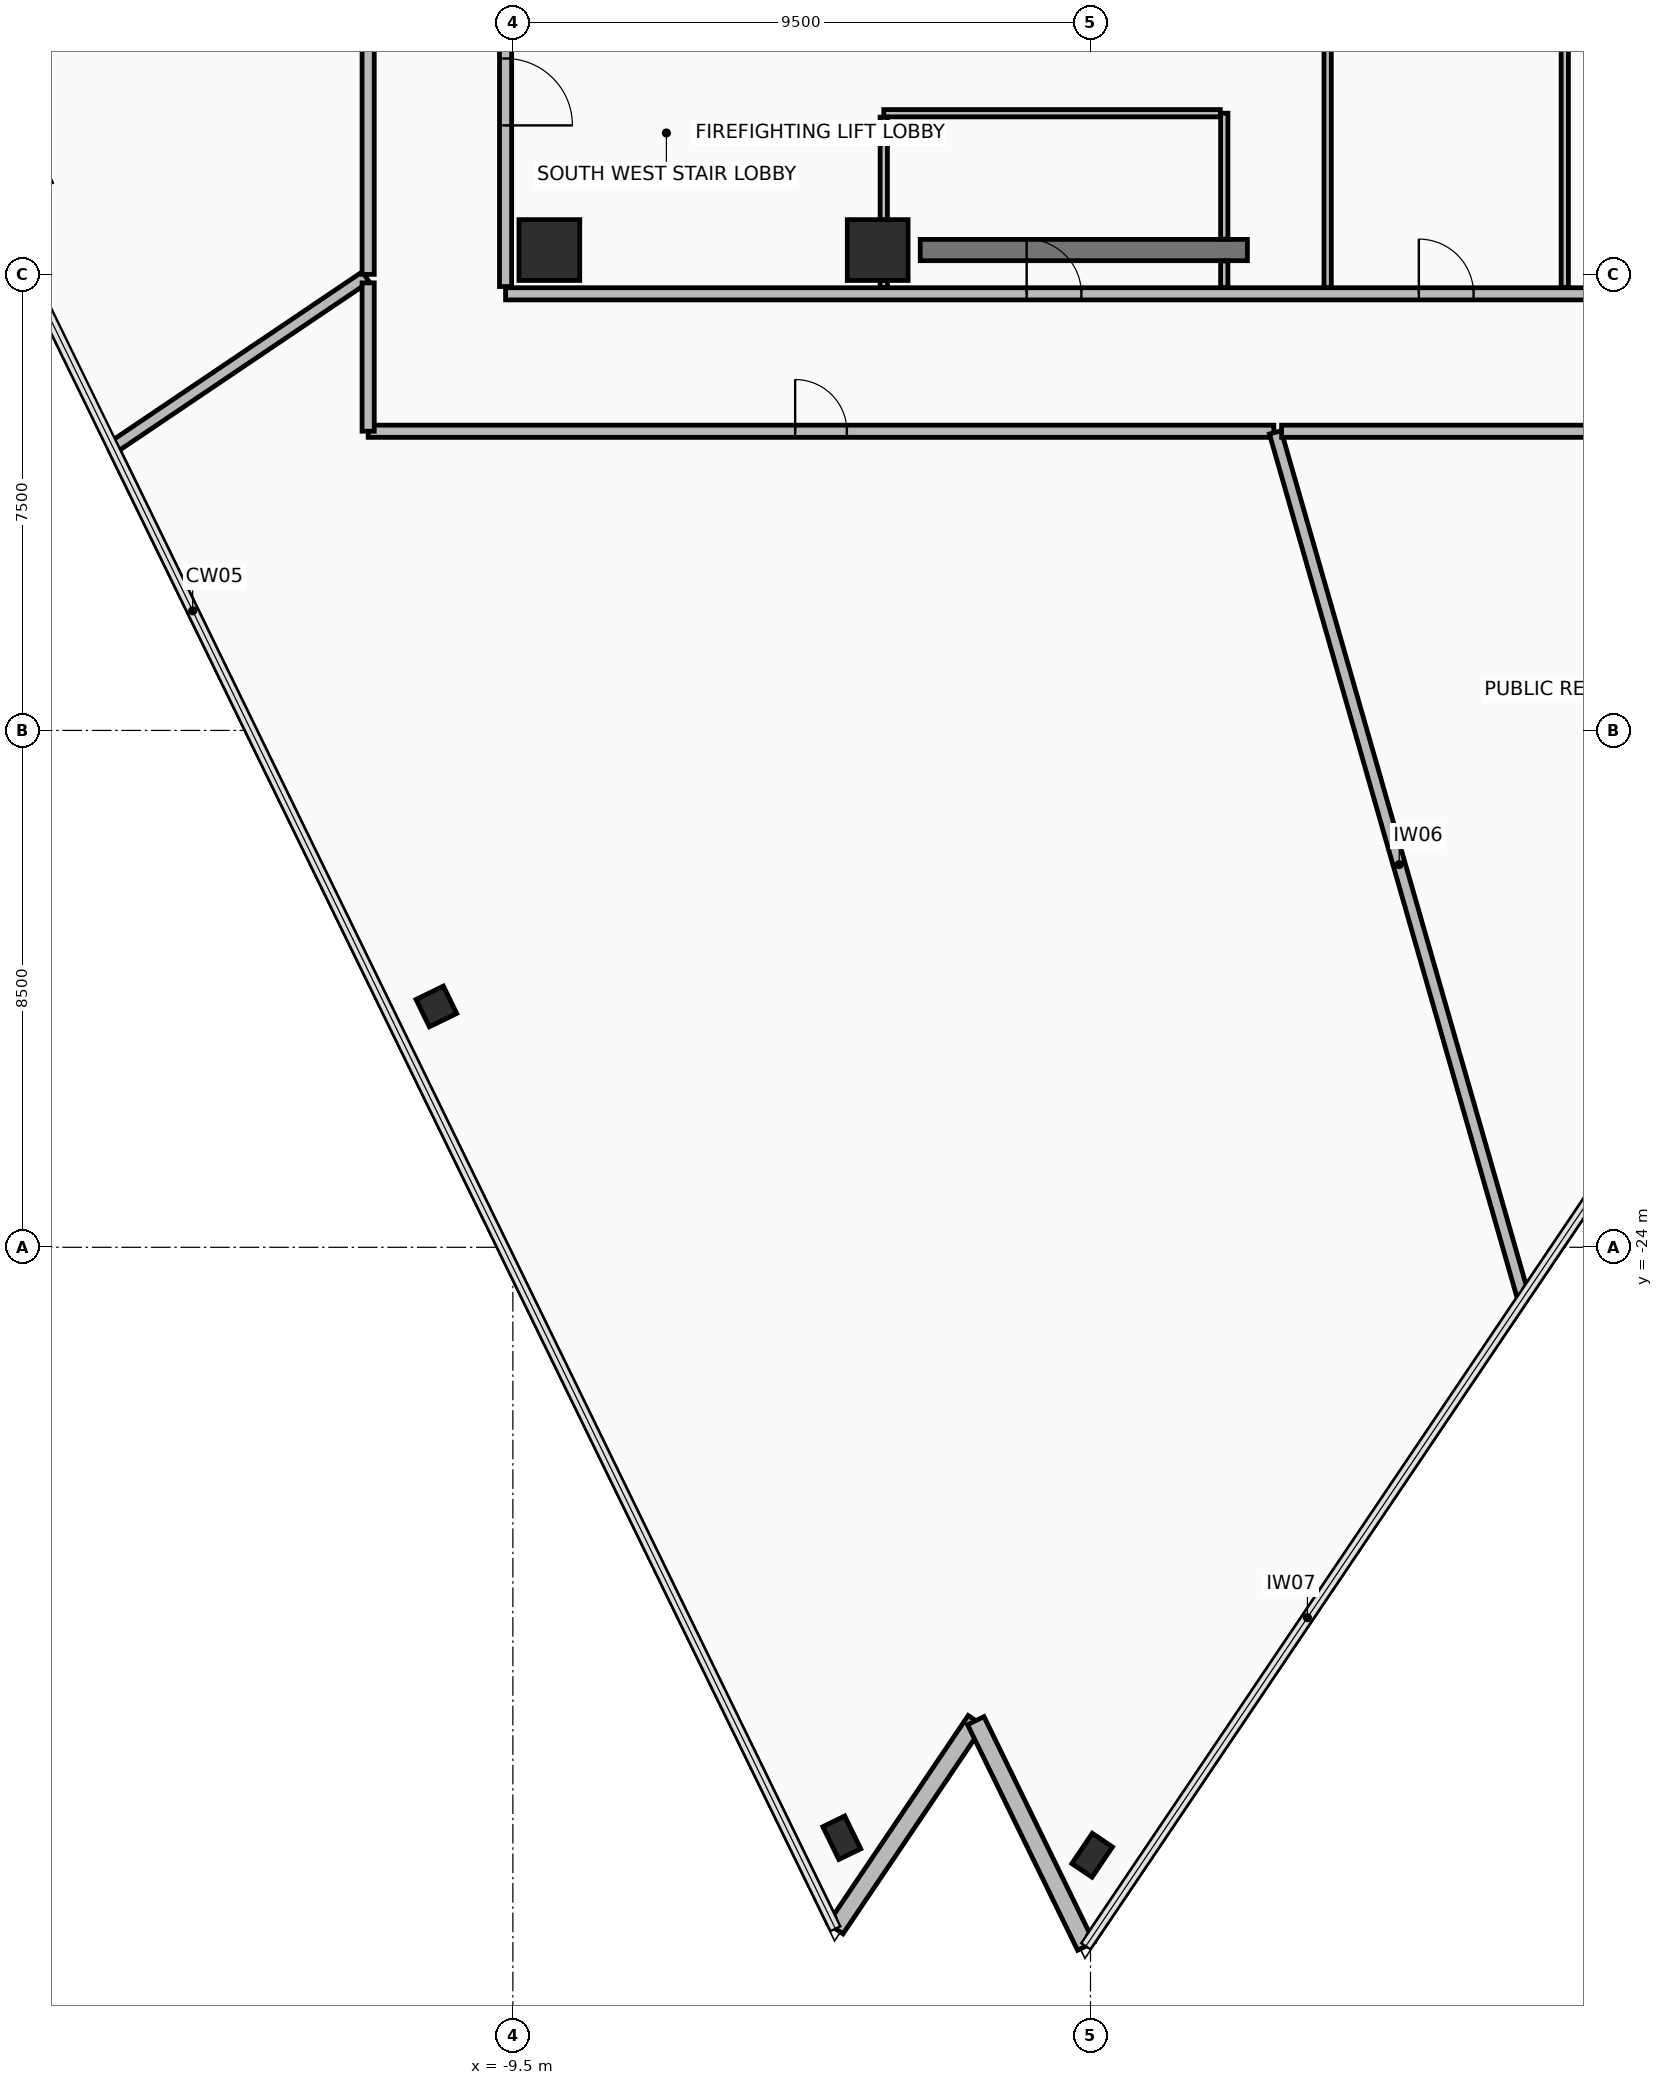
"""IFC4 building model, lengths in metres.
Left out: names, types, materials, properties, quantities, classifications, styles, units other than length and angle.
Written with IfcOpenShell. Run it as: python <this file> out.ifc"""

import sys

from ifc_helpers import new_model, si_unit, direction, frame, frame_2d, origin, origin_2d, place, context, subcontext, project, spatial, rectangle, hollow_rectangle, extrude, element, fill, save


model = new_model("IFC4")
c1 = context("Model", 3, precision=1e-05, world=origin(), true_north=direction((0.0, 1.0)))
c2 = subcontext(c1, "Body", "Model", "MODEL_VIEW")
j1 = project(units=[si_unit("LENGTHUNIT", "METRE"), si_unit("PLANEANGLEUNIT", "RADIAN")], contexts=[c1])
p1 = place(None, origin())
s1 = spatial("IfcSite", under=j1, at=p1, CompositionType="ELEMENT")
p2 = place(p1, origin())
s2 = spatial("IfcBuilding", under=s1, at=p2, CompositionType="ELEMENT")
p3 = place(p2, frame((0.0, 0.0, 230.65)))
s3 = spatial("IfcBuildingStorey", under=s2, at=p3, CompositionType="ELEMENT", Elevation=230.65)
for number, where, z_axis, x_axis in (
    (1, (-8.9, -7.6, 0.0), (0.0, 0.0, 1.0), (1.0, 0.0, 0.0)),
    (2, (-3.5, -7.6, 0.0), (0.0, 0.0, 1.0), (1.0, 0.0, 0.0)),
):
    element("IfcColumn", number, at=place(p3, frame(where, z_axis=z_axis, x_axis=x_axis)), inside=s3, PredefinedType="COLUMN", context=c2, shape_type="SweptSolid", body=[
        extrude(rectangle(XDim=1.0, YDim=1.0, at=origin_2d()), origin(), (0.0, 0.0, 1.0), 3.6),
    ])
p4 = place(p3, frame((-10.758, -20.039, 0.0), z_axis=(0.0, 0.0, 1.0), x_axis=(-0.438371146789, 0.898794046299, 0.0)))
e3 = element("IfcColumn", 3, at=p4, inside=s3, PredefinedType="COLUMN", context=c2, shape_type="SweptSolid", body=[
    extrude(hollow_rectangle(XDim=0.5, YDim=0.5, WallThickness=0.032, at=origin_2d()), origin(), (0.0, 0.0, 1.0), 3.6),
])
for number, where, z_axis, x_axis in (
    (4, (-4.091, -33.71, 0.0), (0.0, 0.0, 1.0), (-0.438, 0.899, 0.0)),
    (5, (0.027, -33.998, 0.0), (0.0, 0.0, 1.0), (0.559, 0.829, 0.0)),
):
    element("IfcColumn", number, at=place(p3, frame(where, z_axis=z_axis, x_axis=x_axis)), inside=s3, PredefinedType="COLUMN", context=c2, shape_type="SweptSolid", body=[
        extrude(hollow_rectangle(XDim=0.4, YDim=0.6, WallThickness=0.03, at=origin_2d()), origin(), (0.0, 0.0, 1.0), 3.6),
    ])
p5 = place(p3, frame((-4.195, -35.207, 0.0), z_axis=(0.0, 0.0, 1.0), x_axis=(0.559182319101, 0.829044711704, 0.0)))
e6 = element("IfcWall", 6, at=p5, inside=s3, PredefinedType="STANDARD", context=c2, shape_type="SweptSolid", body=[
    extrude(rectangle(XDim=4.128, YDim=0.3, at=frame_2d((2.064, 0.0))), origin(), (0.0, 0.0, 1.0), 2.765),
])
p6 = place(p3, frame((-1.887, -31.784, 0.0), z_axis=(0.0, 0.0, 1.0), x_axis=(0.438367699713, -0.898795727542, 0.0)))
e7 = element("IfcWall", 7, at=p6, inside=s3, PredefinedType="STANDARD", context=c2, shape_type="SweptSolid", body=[
    extrude(rectangle(XDim=4.128, YDim=0.3, at=frame_2d((2.064, 0.0))), origin(), (0.0, 0.0, 1.0), 2.765),
])
p7 = place(p3, frame((-2.8, -7.6, 0.0), z_axis=(0.0, 0.0, 1.0), x_axis=(1.0, 0.0, 0.0)))
e8 = element("IfcWall", 8, at=p7, inside=s3, PredefinedType="SHEAR", context=c2, shape_type="SweptSolid", body=[
    extrude(rectangle(XDim=5.38, YDim=0.35, at=frame_2d((2.69, 0.0))), origin(), (0.0, 0.0, 1.0), 3.42),
])
p8 = place(p3, frame((-9.62, -8.32, 0.0), z_axis=(0.0, 0.0, 1.0), x_axis=(1.0, 0.0, 0.0)))
e9 = element("IfcWall", 9, at=p8, inside=s3, PredefinedType="PARTITIONING", context=c2, shape_type="SweptSolid", body=[
    extrude(rectangle(XDim=19.24, YDim=0.2, at=frame_2d((9.62, 0.0))), origin(), (0.0, 0.0, 1.0), 2.915),
])
p9 = place(p8, frame((8.57, 0.0, 0.0)))
e10 = element("IfcOpeningElement", 10, at=p9, cuts=e9, PredefinedType="OPENING", context=c2, shape_type="SweptSolid", body=[
    extrude(rectangle(XDim=0.9, YDim=2.1, at=frame_2d((0.45, 1.05))), frame((0.0, 0.11, 0.0), z_axis=(0.0, -1.0, 0.0), x_axis=(1.0, 0.0, 0.0)), (0.0, 0.0, 1.0), 0.22),
])
p10 = place(p8, frame((15.02, 0.0, 0.0)))
e11 = element("IfcOpeningElement", 11, at=p10, cuts=e9, PredefinedType="OPENING", context=c2, shape_type="SweptSolid", body=[
    extrude(rectangle(XDim=0.9, YDim=2.1, at=frame_2d((0.45, 1.05))), frame((0.0, 0.11, 0.0), z_axis=(0.0, -1.0, 0.0), x_axis=(1.0, 0.0, 0.0)), (0.0, 0.0, 1.0), 0.22),
])
p11 = place(p3, frame((-9.62, 8.2, 0.0), z_axis=(0.0, 0.0, 1.0), x_axis=(0.0, -1.0, 0.0)))
e12 = element("IfcWall", 12, at=p11, inside=s3, PredefinedType="PARTITIONING", context=c2, shape_type="SweptSolid", body=[
    extrude(rectangle(XDim=16.4, YDim=0.2, at=frame_2d((8.2, 0.0))), origin(), (0.0, 0.0, 1.0), 2.765),
])
p12 = place(p11, frame((12.65, 0.0, 0.0)))
e13 = element("IfcOpeningElement", 13, at=p12, cuts=e12, PredefinedType="OPENING", context=c2, shape_type="SweptSolid", body=[
    extrude(rectangle(XDim=1.1, YDim=2.15, at=frame_2d((0.55, 1.075))), frame((0.0, 0.11, 0.0), z_axis=(0.0, -1.0, 0.0), x_axis=(1.0, 0.0, 0.0)), (0.0, 0.0, 1.0), 0.22),
])
p13 = place(p3, frame((2.2, -8.215, 0.0), z_axis=(0.0, 0.0, 1.0), x_axis=(0.0, 1.0, 0.0)))
e14 = element("IfcWall", 14, at=p13, inside=s3, PredefinedType="PARTITIONING", context=c2, shape_type="SweptSolid", body=[
    extrude(rectangle(XDim=0.435, YDim=0.12, at=frame_2d((0.218, 0.0))), origin(), (0.0, 0.0, 1.0), 2.715),
])
p14 = place(p3, frame((2.2, -7.42, 0.0), z_axis=(0.0, 0.0, 1.0), x_axis=(0.0, 1.0, 0.0)))
e15 = element("IfcWall", 15, at=p14, inside=s3, PredefinedType="PARTITIONING", context=c2, shape_type="SweptSolid", body=[
    extrude(rectangle(XDim=2.07, YDim=0.12, at=frame_2d((1.035, 0.0))), origin(), (0.0, 0.0, 1.0), 2.715),
])
p15 = place(p3, frame((2.135, -5.35, 0.0), z_axis=(0.0, 0.0, 1.0), x_axis=(-1.0, 0.0, 0.0)))
e16 = element("IfcWall", 16, at=p15, inside=s3, PredefinedType="PARTITIONING", context=c2, shape_type="SweptSolid", body=[
    extrude(rectangle(XDim=5.535, YDim=0.12, at=frame_2d((2.768, 0.0))), origin(), (0.0, 0.0, 1.0), 2.715),
])
p16 = place(p3, frame((-3.4, -5.415, 0.0), z_axis=(0.0, 0.0, 1.0), x_axis=(0.0, -1.0, 0.0)))
e17 = element("IfcWall", 17, at=p16, inside=s3, PredefinedType="PARTITIONING", context=c2, shape_type="SweptSolid", body=[
    extrude(rectangle(XDim=2.8, YDim=0.12, at=frame_2d((1.4, 0.0))), origin(), (0.0, 0.0, 1.0), 2.715),
])
p17 = place(p3, frame((7.8, -8.215, 0.0), z_axis=(0.0, 0.0, 1.0), x_axis=(0.0, 1.0, 0.0)))
e18 = element("IfcWall", 18, at=p17, inside=s3, PredefinedType="PARTITIONING", context=c2, shape_type="SweptSolid", body=[
    extrude(rectangle(XDim=4.015, YDim=0.12, at=frame_2d((2.008, 0.0))), origin(), (0.0, 0.0, 1.0), 2.715),
])
p18 = place(p3, frame((3.9, -4.265, 0.0), z_axis=(0.0, 0.0, 1.0), x_axis=(0.0, -1.0, 0.0)))
e19 = element("IfcWall", 19, at=p18, inside=s3, PredefinedType="PARTITIONING", context=c2, shape_type="SweptSolid", body=[
    extrude(rectangle(XDim=3.95, YDim=0.12, at=frame_2d((1.975, 0.0))), origin(), (0.0, 0.0, 1.0), 2.715),
])
p19 = place(p3, frame((-11.879, -10.58, 0.0), z_axis=(0.0, 0.0, 1.0), x_axis=(1.0, 0.0, 0.0)))
e20 = element("IfcWall", 20, at=p19, inside=s3, PredefinedType="PARTITIONING", context=c2, shape_type="SweptSolid", body=[
    extrude(rectangle(XDim=14.894, YDim=0.2, at=frame_2d((7.447, 0.0))), origin(), (0.0, 0.0, 1.0), 2.915),
])
p20 = place(p19, frame((7.022, 0.0, 0.0)))
e21 = element("IfcOpeningElement", 21, at=p20, cuts=e20, PredefinedType="OPENING", context=c2, shape_type="SweptSolid", body=[
    extrude(rectangle(XDim=0.85, YDim=2.1, at=frame_2d((0.425, 1.05))), frame((0.0, 0.11, 0.0), z_axis=(0.0, -1.0, 0.0), x_axis=(1.0, 0.0, 0.0)), (0.0, 0.0, 1.0), 0.22),
])
p21 = place(p3, frame((3.039, -10.598, 0.0), z_axis=(0.0, 0.0, 1.0), x_axis=(0.275630178117, -0.961263754082, 0.0)))
e22 = element("IfcWall", 22, at=p21, inside=s3, PredefinedType="PARTITIONING", context=c2, shape_type="SweptSolid", body=[
    extrude(rectangle(XDim=14.79, YDim=0.2, at=frame_2d((7.395, 0.0))), origin(), (0.0, 0.0, 1.0), 2.765),
])
p22 = place(p3, frame((7.112, -24.835, 0.0), z_axis=(0.0, 0.0, 1.0), x_axis=(-0.559202616092, -0.829031021226, 0.0)))
e23 = element("IfcWall", 23, at=p22, inside=s3, PredefinedType="PARTITIONING", context=c2, shape_type="SweptSolid", body=[
    extrude(rectangle(XDim=12.678, YDim=0.15, at=frame_2d((6.339, 0.0))), origin(), (0.0, 0.0, 1.0), 3.42),
])
p23 = place(p3, frame((-4.274, -35.046, 0.0), z_axis=(0.0, 0.0, 1.0), x_axis=(-0.438371605443, 0.898793822599, 0.0)))
e24 = element("IfcWall", 24, at=p23, inside=s3, PredefinedType="PARTITIONING", context=c2, shape_type="SweptSolid", body=[
    extrude(rectangle(XDim=26.905, YDim=0.15, at=frame_2d((13.452, 0.0))), origin(), (0.0, 0.0, 1.0), 3.42),
])
p24 = place(p3, frame((-16.06, -10.832, 0.0), z_axis=(0.0, 0.0, 1.0), x_axis=(0.82905262971, 0.559170579673, 0.0)))
e25 = element("IfcWall", 25, at=p24, inside=s3, PredefinedType="PARTITIONING", context=c2, shape_type="SweptSolid", body=[
    extrude(rectangle(XDim=4.994, YDim=0.2, at=frame_2d((2.497, 0.0))), origin(), (0.0, 0.0, 1.0), 2.765),
])
p25 = place(p3, frame((-11.88, -8.14, 0.0), z_axis=(0.0, 0.0, 1.0), x_axis=(0.0, -1.0, 0.0)))
e26 = element("IfcWall", 26, at=p25, inside=s3, PredefinedType="PARTITIONING", context=c2, shape_type="SweptSolid", body=[
    extrude(rectangle(XDim=2.439, YDim=0.2, at=frame_2d((1.22, 0.0))), origin(), (0.0, 0.0, 1.0), 3.115),
])
p26 = place(p3, frame((3.143, -10.58, 0.0), z_axis=(0.0, 0.0, 1.0), x_axis=(1.0, 0.0, 0.0)))
e27 = element("IfcWall", 27, at=p26, inside=s3, PredefinedType="PARTITIONING", context=c2, shape_type="SweptSolid", body=[
    extrude(rectangle(XDim=8.736, YDim=0.2, at=frame_2d((4.368, 0.0))), origin(), (0.0, 0.0, 1.0), 2.915),
])
p27 = place(p3, frame((23.246, -0.917, 0.0), z_axis=(0.0, 0.0, 1.0), x_axis=(-0.559194966555, -0.829036180984, 0.0)))
e28 = element("IfcWall", 28, at=p27, inside=s3, PredefinedType="PARTITIONING", context=c2, shape_type="SweptSolid", body=[
    extrude(rectangle(XDim=28.702, YDim=0.15, at=frame_2d((14.351, 0.0))), origin(), (0.0, 0.0, 1.0), 3.42),
])
p28 = place(p3, frame((-11.88, 9.27, 0.0), z_axis=(0.0, 0.0, 1.0), x_axis=(0.0, -1.0, 0.0)))
e29 = element("IfcWall", 29, at=p28, inside=s3, PredefinedType="PARTITIONING", context=c2, shape_type="SweptSolid", body=[
    extrude(rectangle(XDim=17.27, YDim=0.2, at=frame_2d((8.635, 0.0))), origin(), (0.0, 0.0, 1.0), 2.765),
])
p29 = place(p28, frame((8.135, 0.0, 0.0)))
e30 = element("IfcOpeningElement", 30, at=p29, cuts=e29, PredefinedType="OPENING", context=c2, shape_type="SweptSolid", body=[
    extrude(rectangle(XDim=1.0, YDim=2.15, at=frame_2d((0.5, 1.075))), frame((0.0, 0.11, 0.0), z_axis=(0.0, -1.0, 0.0), x_axis=(1.0, 0.0, 0.0)), (0.0, 0.0, 1.0), 0.22),
])
p30 = place(p12, frame((1.1, 0.0, 0.0), z_axis=(0.0, 0.0, 1.0), x_axis=(-1.0, 0.0, 0.0)))
e31 = element("IfcDoor", 31, at=p30, inside=s3, OperationType="SINGLE_SWING_LEFT", PredefinedType="DOOR", context=c2, shape_type="SweptSolid", body=[
    extrude(rectangle(XDim=1.1, YDim=2.15, at=frame_2d((0.55, 1.075))), frame((0.0, 0.025, 0.0), z_axis=(0.0, -1.0, 0.0), x_axis=(1.0, 0.0, 0.0)), (0.0, 0.0, 1.0), 0.05),
])
fill(e13, e31)
p31 = place(p9, origin())
e32 = element("IfcDoor", 32, at=p31, inside=s3, OperationType="SINGLE_SWING_LEFT", PredefinedType="DOOR", context=c2, shape_type="SweptSolid", body=[
    extrude(rectangle(XDim=0.9, YDim=2.1, at=frame_2d((0.45, 1.05))), frame((0.0, 0.025, 0.0), z_axis=(0.0, -1.0, 0.0), x_axis=(1.0, 0.0, 0.0)), (0.0, 0.0, 1.0), 0.05),
])
fill(e10, e32)
p32 = place(p10, origin())
e33 = element("IfcDoor", 33, at=p32, inside=s3, OperationType="SINGLE_SWING_LEFT", PredefinedType="DOOR", context=c2, shape_type="SweptSolid", body=[
    extrude(rectangle(XDim=0.9, YDim=2.1, at=frame_2d((0.45, 1.05))), frame((0.0, 0.025, 0.0), z_axis=(0.0, -1.0, 0.0), x_axis=(1.0, 0.0, 0.0)), (0.0, 0.0, 1.0), 0.05),
])
fill(e11, e33)
p33 = place(p20, origin())
e34 = element("IfcDoor", 34, at=p33, inside=s3, OperationType="SINGLE_SWING_RIGHT", PredefinedType="DOOR", context=c2, shape_type="SweptSolid", body=[
    extrude(rectangle(XDim=0.85, YDim=2.1, at=frame_2d((0.425, 1.05))), frame((0.0, 0.025, 0.0), z_axis=(0.0, -1.0, 0.0), x_axis=(1.0, 0.0, 0.0)), (0.0, 0.0, 1.0), 0.05),
])
fill(e21, e34)
save(model, sys.argv[1])
